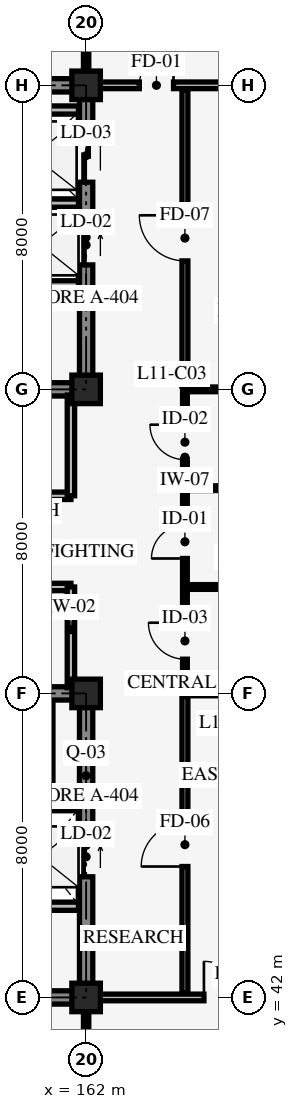
"""IFC4 building model, lengths in metres.
Left out: names, types, materials, properties, quantities, classifications, styles, units other than length and angle.
Written with IfcOpenShell. Run it as: python <this file> out.ifc"""

import sys

from ifc_helpers import new_model, si_unit, direction, frame, frame_2d, origin, origin_2d, place, context, subcontext, project, spatial, rectangle, extrude, element, fill, save


model = new_model("IFC4")
c1 = context("Model", 3, precision=1e-05, world=origin(), true_north=direction((0.0, 1.0)))
c2 = subcontext(c1, "Body", "Model", "MODEL_VIEW")
j1 = project(units=[si_unit("LENGTHUNIT", "METRE"), si_unit("PLANEANGLEUNIT", "RADIAN")], contexts=[c1])
p1 = place(None, origin())
s1 = spatial("IfcSite", under=j1, at=p1, CompositionType="ELEMENT")
p2 = place(p1, origin())
s2 = spatial("IfcBuilding", under=s1, at=p2, CompositionType="ELEMENT")
p3 = place(p2, frame((0.0, 0.0, 44.4)))
s3 = spatial("IfcBuildingStorey", under=s2, at=p3, CompositionType="ELEMENT", Elevation=44.4)
p4 = place(p3, frame((154.0, 42.0, 0.0), z_axis=(0.0, 0.0, 1.0), x_axis=(1.0, 0.0, 0.0)))
e1 = element("IfcWall", 1, at=p4, inside=s3, PredefinedType="SHEAR", context=c2, shape_type="SweptSolid", body=[
    extrude(rectangle(XDim=8.0, YDim=0.35, at=frame_2d((4.0, 0.0))), origin(), (0.0, 0.0, 1.0), 3.95),
])
p5 = place(p3, frame((162.0, 42.0, 0.0), z_axis=(0.0, 0.0, 1.0), x_axis=(0.0, 1.0, 0.0)))
e2 = element("IfcWall", 2, at=p5, inside=s3, PredefinedType="SHEAR", context=c2, shape_type="SweptSolid", body=[
    extrude(rectangle(XDim=8.0, YDim=0.35, at=frame_2d((4.0, 0.0))), origin(), (0.0, 0.0, 1.0), 3.95),
])
p6 = place(p5, frame((3.175, 0.0, 0.0)))
e3 = element("IfcOpeningElement", 3, at=p6, cuts=e2, PredefinedType="OPENING", context=c2, shape_type="SweptSolid", body=[
    extrude(rectangle(XDim=1.05, YDim=2.2, at=frame_2d((0.525, 1.1))), frame((0.0, 0.185, 0.0), z_axis=(0.0, -1.0, 0.0), x_axis=(1.0, 0.0, 0.0)), (0.0, 0.0, 1.0), 0.37),
])
p7 = place(p3, frame((162.0, 50.0, 0.0), z_axis=(0.0, 0.0, 1.0), x_axis=(-1.0, 0.0, 0.0)))
e4 = element("IfcWall", 4, at=p7, inside=s3, PredefinedType="SHEAR", context=c2, shape_type="SweptSolid", body=[
    extrude(rectangle(XDim=8.0, YDim=0.35, at=frame_2d((4.0, 0.0))), origin(), (0.0, 0.0, 1.0), 3.95),
])
p8 = place(p7, frame((5.3, 0.0, 0.0)))
e5 = element("IfcOpeningElement", 5, at=p8, cuts=e4, PredefinedType="OPENING", context=c2, shape_type="SweptSolid", body=[
    extrude(rectangle(XDim=1.3, YDim=2.15, at=frame_2d((0.65, 1.075))), frame((0.0, 0.185, 0.0), z_axis=(0.0, -1.0, 0.0), x_axis=(1.0, 0.0, 0.0)), (0.0, 0.0, 1.0), 0.37),
])
p9 = place(p7, frame((1.45, 0.0, 0.0)))
e6 = element("IfcOpeningElement", 6, at=p9, cuts=e4, PredefinedType="OPENING", context=c2, shape_type="SweptSolid", body=[
    extrude(rectangle(XDim=1.1, YDim=2.2, at=frame_2d((0.55, 1.1))), frame((0.0, 0.185, 0.0), z_axis=(0.0, -1.0, 0.0), x_axis=(1.0, 0.0, 0.0)), (0.0, 0.0, 1.0), 0.37),
])
p10 = place(p3, frame((154.0, 58.0, 0.0), z_axis=(0.0, 0.0, 1.0), x_axis=(1.0, 0.0, 0.0)))
e7 = element("IfcWall", 7, at=p10, inside=s3, PredefinedType="SHEAR", context=c2, shape_type="SweptSolid", body=[
    extrude(rectangle(XDim=8.0, YDim=0.35, at=frame_2d((4.0, 0.0))), origin(), (0.0, 0.0, 1.0), 3.95),
])
p11 = place(p10, frame((1.4, 0.0, 0.0)))
e8 = element("IfcOpeningElement", 8, at=p11, cuts=e7, PredefinedType="OPENING", context=c2, shape_type="SweptSolid", body=[
    extrude(rectangle(XDim=1.3, YDim=2.15, at=frame_2d((0.65, 1.075))), frame((0.0, 0.185, 0.0), z_axis=(0.0, -1.0, 0.0), x_axis=(1.0, 0.0, 0.0)), (0.0, 0.0, 1.0), 0.37),
])
p12 = place(p10, frame((5.3, 0.0, 0.0)))
e9 = element("IfcOpeningElement", 9, at=p12, cuts=e7, PredefinedType="OPENING", context=c2, shape_type="SweptSolid", body=[
    extrude(rectangle(XDim=1.1, YDim=2.2, at=frame_2d((0.55, 1.1))), frame((0.0, 0.185, 0.0), z_axis=(0.0, -1.0, 0.0), x_axis=(1.0, 0.0, 0.0)), (0.0, 0.0, 1.0), 0.37),
])
p13 = place(p3, frame((162.0, 58.0, 0.0), z_axis=(0.0, 0.0, 1.0), x_axis=(0.0, 1.0, 0.0)))
e10 = element("IfcWall", 10, at=p13, inside=s3, PredefinedType="SHEAR", context=c2, shape_type="SweptSolid", body=[
    extrude(rectangle(XDim=8.0, YDim=0.35, at=frame_2d((4.0, 0.0))), origin(), (0.0, 0.0, 1.0), 3.95),
])
p14 = place(p13, frame((3.275, 0.0, 0.0)))
e11 = element("IfcOpeningElement", 11, at=p14, cuts=e10, PredefinedType="OPENING", context=c2, shape_type="SweptSolid", body=[
    extrude(rectangle(XDim=1.05, YDim=2.2, at=frame_2d((0.525, 1.1))), frame((0.0, 0.185, 0.0), z_axis=(0.0, -1.0, 0.0), x_axis=(1.0, 0.0, 0.0)), (0.0, 0.0, 1.0), 0.37),
])
p15 = place(p13, frame((5.45, 0.0, 0.0)))
e12 = element("IfcOpeningElement", 12, at=p15, cuts=e10, PredefinedType="OPENING", context=c2, shape_type="SweptSolid", body=[
    extrude(rectangle(XDim=1.4, YDim=2.3, at=frame_2d((0.7, 1.15))), frame((0.0, 0.185, 0.0), z_axis=(0.0, -1.0, 0.0), x_axis=(1.0, 0.0, 0.0)), (0.0, 0.0, 1.0), 0.37),
])
p16 = place(p3, frame((162.0, 66.0, 0.0), z_axis=(0.0, 0.0, 1.0), x_axis=(-1.0, 0.0, 0.0)))
e13 = element("IfcWall", 13, at=p16, inside=s3, PredefinedType="SHEAR", context=c2, shape_type="SweptSolid", body=[
    extrude(rectangle(XDim=8.0, YDim=0.35, at=frame_2d((4.0, 0.0))), origin(), (0.0, 0.0, 1.0), 3.95),
])
for number, where, z_axis, x_axis in (
    (14, (162.0, 42.0, 0.0), (0.0, 0.0, 1.0), (1.0, 0.0, 0.0)),
    (15, (162.0, 50.0, 0.0), (0.0, 0.0, 1.0), (1.0, 0.0, 0.0)),
    (16, (162.0, 58.0, 0.0), (0.0, 0.0, 1.0), (1.0, 0.0, 0.0)),
    (17, (162.0, 66.0, 0.0), (0.0, 0.0, 1.0), (1.0, 0.0, 0.0)),
):
    element("IfcColumn", number, at=place(p3, frame(where, z_axis=z_axis, x_axis=x_axis)), inside=s3, PredefinedType="COLUMN", context=c2, shape_type="SweptSolid", body=[
        extrude(rectangle(XDim=0.75, YDim=0.75, at=origin_2d()), origin(), (0.0, 0.0, 1.0), 4.2),
    ])
p17 = place(p3, frame((158.45, 47.02, 0.0), z_axis=(0.0, 0.0, 1.0), x_axis=(1.0, 0.0, 0.0)))
e18 = element("IfcWall", 18, at=p17, inside=s3, PredefinedType="STANDARD", context=c2, shape_type="SweptSolid", body=[
    extrude(rectangle(XDim=3.35, YDim=0.215, at=frame_2d((1.675, 0.0))), origin(), (0.0, 0.0, 1.0), 3.9),
])
p18 = place(p3, frame((161.02, 47.02, 0.0), z_axis=(0.0, 0.0, 1.0), x_axis=(0.0, 1.0, 0.0)))
e19 = element("IfcWall", 19, at=p18, inside=s3, PredefinedType="STANDARD", context=c2, shape_type="SweptSolid", body=[
    extrude(rectangle(XDim=2.78, YDim=0.215, at=frame_2d((1.39, 0.0))), origin(), (0.0, 0.0, 1.0), 3.9),
])
p19 = place(p3, frame((159.78, 44.4, 0.0), z_axis=(0.0, 0.0, 1.0), x_axis=(1.0, 0.0, 0.0)))
e20 = element("IfcWall", 20, at=p19, inside=s3, PredefinedType="STANDARD", context=c2, shape_type="SweptSolid", body=[
    extrude(rectangle(XDim=2.02, YDim=0.215, at=frame_2d((1.01, 0.0))), origin(), (0.0, 0.0, 1.0), 3.9),
])
p20 = place(p3, frame((158.45, 62.9, 0.0), z_axis=(0.0, 0.0, 1.0), x_axis=(1.0, 0.0, 0.0)))
e21 = element("IfcWall", 21, at=p20, inside=s3, PredefinedType="STANDARD", context=c2, shape_type="SweptSolid", body=[
    extrude(rectangle(XDim=3.35, YDim=0.215, at=frame_2d((1.675, 0.0))), origin(), (0.0, 0.0, 1.0), 3.9),
])
p21 = place(p3, frame((159.38, 65.35, 0.0), z_axis=(0.0, 0.0, 1.0), x_axis=(1.0, 0.0, 0.0)))
e22 = element("IfcWall", 22, at=p21, inside=s3, PredefinedType="STANDARD", context=c2, shape_type="SweptSolid", body=[
    extrude(rectangle(XDim=2.42, YDim=0.215, at=frame_2d((1.21, 0.0))), origin(), (0.0, 0.0, 1.0), 3.9),
])
p22 = place(p3, frame((158.45, 60.75, 0.0), z_axis=(0.0, 0.0, 1.0), x_axis=(1.0, 0.0, 0.0)))
e23 = element("IfcWall", 23, at=p22, inside=s3, PredefinedType="STANDARD", context=c2, shape_type="SweptSolid", body=[
    extrude(rectangle(XDim=3.35, YDim=0.215, at=frame_2d((1.675, 0.0))), origin(), (0.0, 0.0, 1.0), 3.9),
])
p23 = place(p3, frame((154.0, 52.8, 0.0), z_axis=(0.0, 0.0, 1.0), x_axis=(1.0, 0.0, 0.0)))
e24 = element("IfcWall", 24, at=p23, inside=s3, PredefinedType="STANDARD", context=c2, shape_type="SweptSolid", body=[
    extrude(rectangle(XDim=7.6, YDim=0.195, at=frame_2d((3.8, 0.0))), origin(), (0.0, 0.0, 1.0), 3.9),
])
p24 = place(p23, frame((2.8, 0.0, 0.0)))
e25 = element("IfcOpeningElement", 25, at=p24, cuts=e24, PredefinedType="OPENING", context=c2, shape_type="SweptSolid", body=[
    extrude(rectangle(XDim=1.45, YDim=2.2, at=frame_2d((0.725, 1.1))), frame((0.0, 0.107, 0.0), z_axis=(0.0, -1.0, 0.0), x_axis=(1.0, 0.0, 0.0)), (0.0, 0.0, 1.0), 0.215),
])
p25 = place(p3, frame((161.6, 50.15, 0.0), z_axis=(0.0, 0.0, 1.0), x_axis=(0.0, 1.0, 0.0)))
e26 = element("IfcWall", 26, at=p25, inside=s3, PredefinedType="STANDARD", context=c2, shape_type="SweptSolid", body=[
    extrude(rectangle(XDim=2.65, YDim=0.195, at=frame_2d((1.325, 0.0))), origin(), (0.0, 0.0, 1.0), 3.24),
])
p26 = place(p3, frame((154.0, 55.2, 0.0), z_axis=(0.0, 0.0, 1.0), x_axis=(1.0, 0.0, 0.0)))
e27 = element("IfcWall", 27, at=p26, inside=s3, PredefinedType="STANDARD", context=c2, shape_type="SweptSolid", body=[
    extrude(rectangle(XDim=7.6, YDim=0.195, at=frame_2d((3.8, 0.0))), origin(), (0.0, 0.0, 1.0), 3.9),
])
p27 = place(p26, frame((2.8, 0.0, 0.0)))
e28 = element("IfcOpeningElement", 28, at=p27, cuts=e27, PredefinedType="OPENING", context=c2, shape_type="SweptSolid", body=[
    extrude(rectangle(XDim=1.25, YDim=2.15, at=frame_2d((0.625, 1.075))), frame((0.0, 0.107, 0.0), z_axis=(0.0, -1.0, 0.0), x_axis=(1.0, 0.0, 0.0)), (0.0, 0.0, 1.0), 0.215),
])
p28 = place(p3, frame((161.6, 55.2, 0.0), z_axis=(0.0, 0.0, 1.0), x_axis=(0.0, 1.0, 0.0)))
e29 = element("IfcWall", 29, at=p28, inside=s3, PredefinedType="STANDARD", context=c2, shape_type="SweptSolid", body=[
    extrude(rectangle(XDim=2.65, YDim=0.195, at=frame_2d((1.325, 0.0))), origin(), (0.0, 0.0, 1.0), 3.24),
])
p29 = place(p3, frame((164.6, 50.0, 0.0), z_axis=(0.0, 0.0, 1.0), x_axis=(0.0, 1.0, 0.0)))
e30 = element("IfcWall", 30, at=p29, inside=s3, PredefinedType="STANDARD", context=c2, shape_type="SweptSolid", body=[
    extrude(rectangle(XDim=8.0, YDim=0.125, at=frame_2d((4.0, 0.0))), origin(), (0.0, 0.0, 1.0), 3.9),
])
p30 = place(p29, frame((0.9, 0.0, 0.0)))
e31 = element("IfcOpeningElement", 31, at=p30, cuts=e30, PredefinedType="OPENING", context=c2, shape_type="SweptSolid", body=[
    extrude(rectangle(XDim=0.96, YDim=2.08, at=frame_2d((0.48, 1.04))), frame((0.0, 0.073, 0.0), z_axis=(0.0, -1.0, 0.0), x_axis=(1.0, 0.0, 0.0)), (0.0, 0.0, 1.0), 0.145),
])
p31 = place(p29, frame((3.55, 0.0, 0.0)))
e32 = element("IfcOpeningElement", 32, at=p31, cuts=e30, PredefinedType="OPENING", context=c2, shape_type="SweptSolid", body=[
    extrude(rectangle(XDim=0.88, YDim=2.05, at=frame_2d((0.44, 1.025))), frame((0.0, 0.073, 0.0), z_axis=(0.0, -1.0, 0.0), x_axis=(1.0, 0.0, 0.0)), (0.0, 0.0, 1.0), 0.145),
])
p32 = place(p29, frame((6.15, 0.0, 0.0)))
e33 = element("IfcOpeningElement", 33, at=p32, cuts=e30, PredefinedType="OPENING", context=c2, shape_type="SweptSolid", body=[
    extrude(rectangle(XDim=0.92, YDim=2.05, at=frame_2d((0.46, 1.025))), frame((0.0, 0.073, 0.0), z_axis=(0.0, -1.0, 0.0), x_axis=(1.0, 0.0, 0.0)), (0.0, 0.0, 1.0), 0.145),
])
p33 = place(p3, frame((164.6, 50.0, 0.0), z_axis=(0.0, 0.0, 1.0), x_axis=(1.0, 0.0, 0.0)))
e34 = element("IfcWall", 34, at=p33, inside=s3, PredefinedType="STANDARD", context=c2, shape_type="SweptSolid", body=[
    extrude(rectangle(XDim=3.8, YDim=0.125, at=frame_2d((1.9, 0.0))), origin(), (0.0, 0.0, 1.0), 3.19),
])
for number, where, z_axis, x_axis in (
    (35, (164.6, 52.8, 0.0), (0.0, 0.0, 1.0), (1.0, 0.0, 0.0)),
    (36, (164.6, 55.4, 0.0), (0.0, 0.0, 1.0), (1.0, 0.0, 0.0)),
):
    element("IfcWall", number, at=place(p3, frame(where, z_axis=z_axis, x_axis=x_axis)), inside=s3, PredefinedType="STANDARD", context=c2, shape_type="SweptSolid", body=[
        extrude(rectangle(XDim=3.8, YDim=0.125, at=frame_2d((1.9, 0.0))), origin(), (0.0, 0.0, 1.0), 3.9),
    ])
p34 = place(p3, frame((164.6, 58.0, 0.0), z_axis=(0.0, 0.0, 1.0), x_axis=(1.0, 0.0, 0.0)))
e37 = element("IfcWall", 37, at=p34, inside=s3, PredefinedType="STANDARD", context=c2, shape_type="SweptSolid", body=[
    extrude(rectangle(XDim=3.8, YDim=0.125, at=frame_2d((1.9, 0.0))), origin(), (0.0, 0.0, 1.0), 3.19),
])
p35 = place(p3, frame((164.6, 42.12, 0.0), z_axis=(0.0, 0.0, 1.0), x_axis=(0.0, 1.0, 0.0)))
e38 = element("IfcWall", 38, at=p35, inside=s3, PredefinedType="STANDARD", context=c2, shape_type="SweptSolid", body=[
    extrude(rectangle(XDim=7.8, YDim=0.155, at=frame_2d((3.9, 0.0))), origin(), (0.0, 0.0, 1.0), 3.9),
])
p36 = place(p35, frame((3.325, 0.0, 0.0)))
e39 = element("IfcOpeningElement", 39, at=p36, cuts=e38, PredefinedType="OPENING", context=c2, shape_type="SweptSolid", body=[
    extrude(rectangle(XDim=1.15, YDim=2.1, at=frame_2d((0.575, 1.05))), frame((0.0, 0.087, 0.0), z_axis=(0.0, -1.0, 0.0), x_axis=(1.0, 0.0, 0.0)), (0.0, 0.0, 1.0), 0.175),
])
p37 = place(p3, frame((164.6, 58.08, 0.0), z_axis=(0.0, 0.0, 1.0), x_axis=(0.0, 1.0, 0.0)))
e40 = element("IfcWall", 40, at=p37, inside=s3, PredefinedType="STANDARD", context=c2, shape_type="SweptSolid", body=[
    extrude(rectangle(XDim=7.8, YDim=0.155, at=frame_2d((3.9, 0.0))), origin(), (0.0, 0.0, 1.0), 3.9),
])
p38 = place(p37, frame((3.3, 0.0, 0.0)))
e41 = element("IfcOpeningElement", 41, at=p38, cuts=e40, PredefinedType="OPENING", context=c2, shape_type="SweptSolid", body=[
    extrude(rectangle(XDim=1.2, YDim=2.1, at=frame_2d((0.6, 1.05))), frame((0.0, 0.087, 0.0), z_axis=(0.0, -1.0, 0.0), x_axis=(1.0, 0.0, 0.0)), (0.0, 0.0, 1.0), 0.175),
])
p39 = place(p3, frame((162.0, 34.05, 0.0), z_axis=(0.0, 0.0, 1.0), x_axis=(0.0, 1.0, 0.0)))
e42 = element("IfcWall", 42, at=p39, inside=s3, PredefinedType="STANDARD", context=c2, shape_type="SweptSolid", body=[
    extrude(rectangle(XDim=7.83, YDim=0.14, at=frame_2d((3.915, 0.0))), origin(), (0.0, 0.0, 1.0), 3.24),
])
p40 = place(p39, frame((3.0, 0.0, 0.0)))
e43 = element("IfcOpeningElement", 43, at=p40, cuts=e42, PredefinedType="OPENING", context=c2, shape_type="SweptSolid", body=[
    extrude(rectangle(XDim=1.06, YDim=2.12, at=frame_2d((0.53, 1.06))), frame((0.0, 0.08, 0.0), z_axis=(0.0, -1.0, 0.0), x_axis=(1.0, 0.0, 0.0)), (0.0, 0.0, 1.0), 0.16),
])
p41 = place(p3, frame((162.35, 42.0, 0.0), z_axis=(0.0, 0.0, 1.0), x_axis=(1.0, 0.0, 0.0)))
e44 = element("IfcWall", 44, at=p41, inside=s3, PredefinedType="STANDARD", context=c2, shape_type="SweptSolid", body=[
    extrude(rectangle(XDim=14.7, YDim=0.175, at=frame_2d((7.35, 0.0))), origin(), (0.0, 0.0, 1.0), 3.19),
])
p42 = place(p41, frame((2.75, 0.0, 0.0)))
e45 = element("IfcOpeningElement", 45, at=p42, cuts=e44, PredefinedType="OPENING", context=c2, shape_type="SweptSolid", body=[
    extrude(rectangle(XDim=1.9, YDim=2.35, at=frame_2d((0.95, 1.175))), frame((0.0, 0.098, 0.0), z_axis=(0.0, -1.0, 0.0), x_axis=(1.0, 0.0, 0.0)), (0.0, 0.0, 1.0), 0.195),
])
p43 = place(p3, frame((162.0, 66.12, 0.0), z_axis=(0.0, 0.0, 1.0), x_axis=(0.0, 1.0, 0.0)))
e46 = element("IfcWall", 46, at=p43, inside=s3, PredefinedType="STANDARD", context=c2, shape_type="SweptSolid", body=[
    extrude(rectangle(XDim=7.83, YDim=0.14, at=frame_2d((3.915, 0.0))), origin(), (0.0, 0.0, 1.0), 3.9),
])
p44 = place(p43, frame((3.0, 0.0, 0.0)))
e47 = element("IfcOpeningElement", 47, at=p44, cuts=e46, PredefinedType="OPENING", context=c2, shape_type="SweptSolid", body=[
    extrude(rectangle(XDim=1.12, YDim=2.12, at=frame_2d((0.56, 1.06))), frame((0.0, 0.08, 0.0), z_axis=(0.0, -1.0, 0.0), x_axis=(1.0, 0.0, 0.0)), (0.0, 0.0, 1.0), 0.16),
])
p45 = place(p3, frame((162.35, 66.0, 0.0), z_axis=(0.0, 0.0, 1.0), x_axis=(1.0, 0.0, 0.0)))
e48 = element("IfcWall", 48, at=p45, inside=s3, PredefinedType="STANDARD", context=c2, shape_type="SweptSolid", body=[
    extrude(rectangle(XDim=14.7, YDim=0.175, at=frame_2d((7.35, 0.0))), origin(), (0.0, 0.0, 1.0), 3.19),
])
p46 = place(p45, frame((1.05, 0.0, 0.0)))
e49 = element("IfcOpeningElement", 49, at=p46, cuts=e48, PredefinedType="OPENING", context=c2, shape_type="SweptSolid", body=[
    extrude(rectangle(XDim=0.9, YDim=2.1, at=frame_2d((0.45, 1.05))), frame((0.0, 0.098, 0.0), z_axis=(0.0, -1.0, 0.0), x_axis=(1.0, 0.0, 0.0)), (0.0, 0.0, 1.0), 0.195),
])
p47 = place(p6, origin())
e50 = element("IfcDoor", 50, at=p47, inside=s3, OperationType="SLIDING_TO_LEFT", PredefinedType="DOOR", context=c2, shape_type="SweptSolid", body=[
    extrude(rectangle(XDim=1.05, YDim=2.2, at=frame_2d((0.525, 1.1))), frame((0.0, 0.025, 0.0), z_axis=(0.0, -1.0, 0.0), x_axis=(1.0, 0.0, 0.0)), (0.0, 0.0, 1.0), 0.05),
])
fill(e3, e50)
p48 = place(p14, origin())
e51 = element("IfcDoor", 51, at=p48, inside=s3, OperationType="SLIDING_TO_RIGHT", PredefinedType="DOOR", context=c2, shape_type="SweptSolid", body=[
    extrude(rectangle(XDim=1.05, YDim=2.2, at=frame_2d((0.525, 1.1))), frame((0.0, 0.025, 0.0), z_axis=(0.0, -1.0, 0.0), x_axis=(1.0, 0.0, 0.0)), (0.0, 0.0, 1.0), 0.05),
])
fill(e11, e51)
p49 = place(p15, origin())
e52 = element("IfcDoor", 52, at=p49, inside=s3, OperationType="DOUBLE_DOOR_SLIDING", PredefinedType="DOOR", context=c2, shape_type="SweptSolid", body=[
    extrude(rectangle(XDim=1.4, YDim=2.3, at=frame_2d((0.7, 1.15))), frame((0.0, 0.025, 0.0), z_axis=(0.0, -1.0, 0.0), x_axis=(1.0, 0.0, 0.0)), (0.0, 0.0, 1.0), 0.05),
])
fill(e12, e52)
p50 = place(p30, origin())
e53 = element("IfcDoor", 53, at=p50, inside=s3, OperationType="SINGLE_SWING_RIGHT", PredefinedType="DOOR", context=c2, shape_type="SweptSolid", body=[
    extrude(rectangle(XDim=0.96, YDim=2.08, at=frame_2d((0.48, 1.04))), frame((0.0, 0.025, 0.0), z_axis=(0.0, -1.0, 0.0), x_axis=(1.0, 0.0, 0.0)), (0.0, 0.0, 1.0), 0.05),
])
fill(e31, e53)
p51 = place(p31, origin())
e54 = element("IfcDoor", 54, at=p51, inside=s3, OperationType="SINGLE_SWING_LEFT", PredefinedType="DOOR", context=c2, shape_type="SweptSolid", body=[
    extrude(rectangle(XDim=0.88, YDim=2.05, at=frame_2d((0.44, 1.025))), frame((0.0, 0.025, 0.0), z_axis=(0.0, -1.0, 0.0), x_axis=(1.0, 0.0, 0.0)), (0.0, 0.0, 1.0), 0.05),
])
fill(e32, e54)
p52 = place(p32, origin())
e55 = element("IfcDoor", 55, at=p52, inside=s3, OperationType="SINGLE_SWING_RIGHT", PredefinedType="DOOR", context=c2, shape_type="SweptSolid", body=[
    extrude(rectangle(XDim=0.92, YDim=2.05, at=frame_2d((0.46, 1.025))), frame((0.0, 0.025, 0.0), z_axis=(0.0, -1.0, 0.0), x_axis=(1.0, 0.0, 0.0)), (0.0, 0.0, 1.0), 0.05),
])
fill(e33, e55)
p53 = place(p36, origin())
e56 = element("IfcDoor", 56, at=p53, inside=s3, OperationType="SINGLE_SWING_LEFT", PredefinedType="DOOR", context=c2, shape_type="SweptSolid", body=[
    extrude(rectangle(XDim=1.15, YDim=2.1, at=frame_2d((0.575, 1.05))), frame((0.0, 0.025, 0.0), z_axis=(0.0, -1.0, 0.0), x_axis=(1.0, 0.0, 0.0)), (0.0, 0.0, 1.0), 0.05),
])
fill(e39, e56)
p54 = place(p38, origin())
e57 = element("IfcDoor", 57, at=p54, inside=s3, OperationType="SINGLE_SWING_RIGHT", PredefinedType="DOOR", context=c2, shape_type="SweptSolid", body=[
    extrude(rectangle(XDim=1.2, YDim=2.1, at=frame_2d((0.6, 1.05))), frame((0.0, 0.025, 0.0), z_axis=(0.0, -1.0, 0.0), x_axis=(1.0, 0.0, 0.0)), (0.0, 0.0, 1.0), 0.05),
])
fill(e41, e57)
p55 = place(p42, origin())
e58 = element("IfcDoor", 58, at=p55, inside=s3, OperationType="DOUBLE_DOOR_SINGLE_SWING", PredefinedType="DOOR", context=c2, shape_type="SweptSolid", body=[
    extrude(rectangle(XDim=1.9, YDim=2.35, at=frame_2d((0.95, 1.175))), frame((0.0, 0.025, 0.0), z_axis=(0.0, -1.0, 0.0), x_axis=(1.0, 0.0, 0.0)), (0.0, 0.0, 1.0), 0.05),
])
fill(e45, e58)
p56 = place(p46, origin())
e59 = element("IfcDoor", 59, at=p56, inside=s3, OperationType="SINGLE_SWING_RIGHT", PredefinedType="DOOR", context=c2, shape_type="SweptSolid", body=[
    extrude(rectangle(XDim=0.9, YDim=2.1, at=frame_2d((0.45, 1.05))), frame((0.0, 0.025, 0.0), z_axis=(0.0, -1.0, 0.0), x_axis=(1.0, 0.0, 0.0)), (0.0, 0.0, 1.0), 0.05),
])
fill(e49, e59)
save(model, sys.argv[1])
